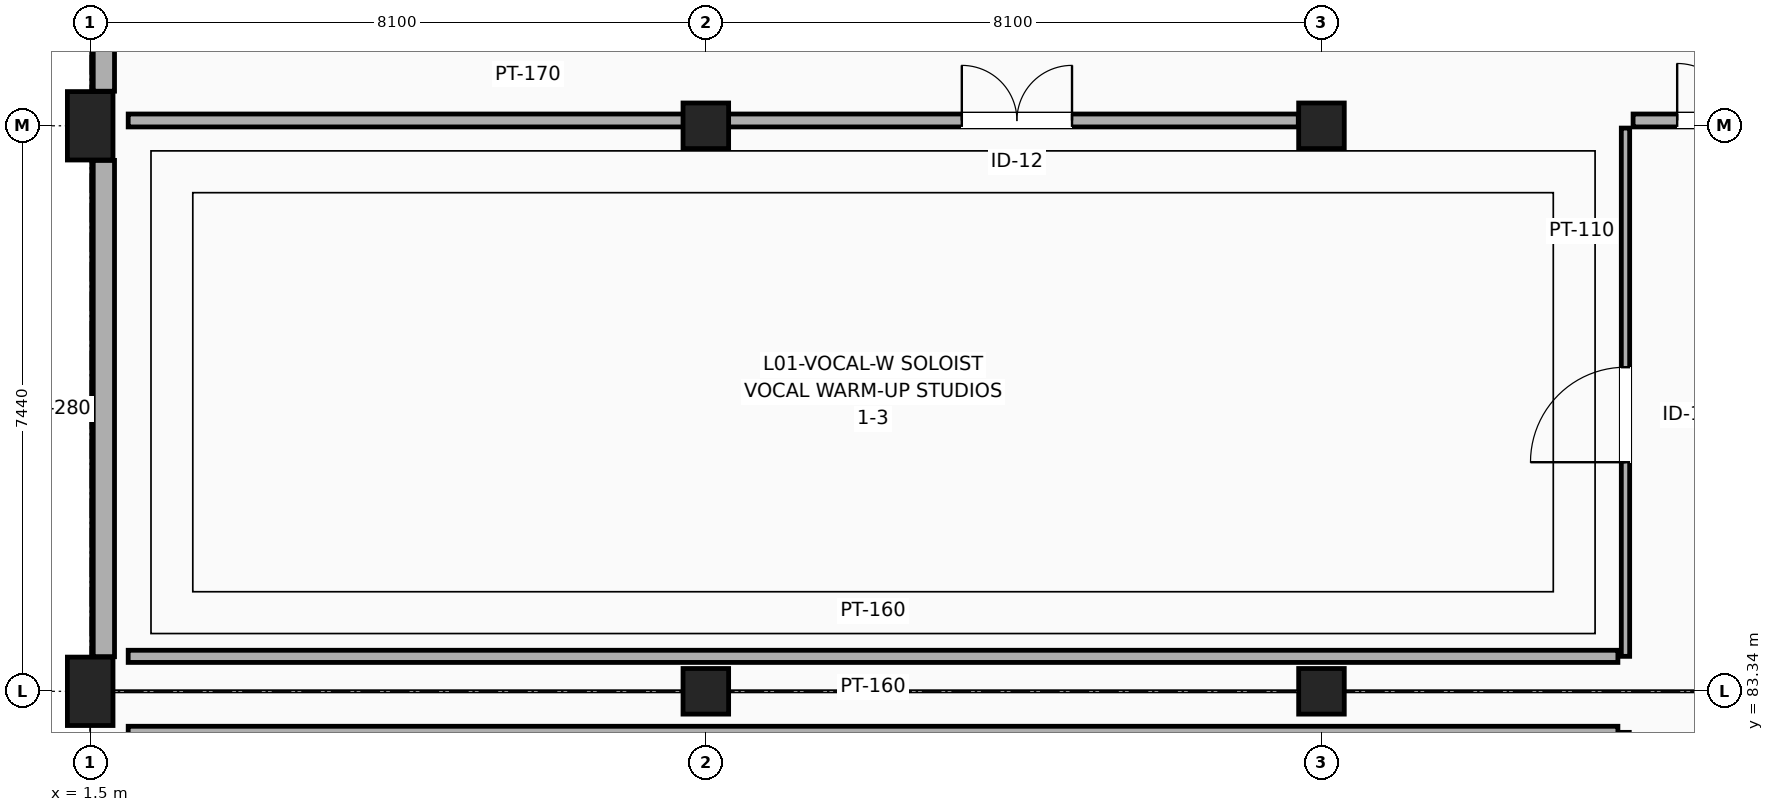
"""IFC4 building model, lengths in metres.
Left out: names, types, materials, properties, quantities, classifications, styles, units other than length and angle.
Written with IfcOpenShell. Run it as: python <this file> out.ifc"""

import sys

from ifc_helpers import new_model, si_unit, direction, frame, frame_2d, origin, origin_2d, place, context, subcontext, project, spatial, rectangle, extrude, element, fill, save


model = new_model("IFC4")
c1 = context("Model", 3, precision=1e-05, world=origin(), true_north=direction((0.0, 1.0)))
c2 = subcontext(c1, "Body", "Model", "MODEL_VIEW")
j1 = project(units=[si_unit("LENGTHUNIT", "METRE"), si_unit("PLANEANGLEUNIT", "RADIAN")], contexts=[c1])
p1 = place(None, origin())
s1 = spatial("IfcSite", under=j1, at=p1, CompositionType="ELEMENT")
p2 = place(p1, origin())
s2 = spatial("IfcBuilding", under=s1, at=p2, CompositionType="ELEMENT")
p3 = place(p2, frame((0.0, 0.0, 5.4)))
s3 = spatial("IfcBuildingStorey", under=s2, at=p3, CompositionType="ELEMENT", Elevation=5.4)
for number, where, z_axis, x_axis in (
    (1, (1.5, 83.34, 0.0), (0.0, 0.0, 1.0), (1.0, 0.0, 0.0)),
    (2, (1.5, 90.78, 0.0), (0.0, 0.0, 1.0), (1.0, 0.0, 0.0)),
):
    element("IfcColumn", number, at=place(p3, frame(where, z_axis=z_axis, x_axis=x_axis)), inside=s3, PredefinedType="COLUMN", context=c2, shape_type="SweptSolid", body=[
        extrude(rectangle(XDim=0.6, YDim=0.9, at=origin_2d()), origin(), (0.0, 0.0, 1.0), 4.8),
    ])
for number, where, z_axis, x_axis in (
    (3, (9.6, 83.34, 0.0), (0.0, 0.0, 1.0), (1.0, 0.0, 0.0)),
    (4, (9.6, 90.78, 0.0), (0.0, 0.0, 1.0), (1.0, 0.0, 0.0)),
    (5, (17.7, 83.34, 0.0), (0.0, 0.0, 1.0), (1.0, 0.0, 0.0)),
    (6, (17.7, 90.78, 0.0), (0.0, 0.0, 1.0), (1.0, 0.0, 0.0)),
):
    element("IfcColumn", number, at=place(p3, frame(where, z_axis=z_axis, x_axis=x_axis)), inside=s3, PredefinedType="COLUMN", context=c2, shape_type="SweptSolid", body=[
        extrude(rectangle(XDim=0.6, YDim=0.6, at=origin_2d()), origin(), (0.0, 0.0, 1.0), 4.8),
    ])
p4 = place(p3, frame((1.68, 83.795, 0.0), z_axis=(0.0, 0.0, 1.0), x_axis=(0.0, 1.0, 0.0)))
e7 = element("IfcWall", 7, at=p4, inside=s3, PredefinedType="SOLIDWALL", context=c2, shape_type="SweptSolid", body=[
    extrude(rectangle(XDim=6.53, YDim=0.28, at=frame_2d((3.265, 0.0))), origin(), (0.0, 0.0, 1.0), 4.187),
])
p5 = place(p3, frame((1.68, 91.235, 0.0), z_axis=(0.0, 0.0, 1.0), x_axis=(0.0, 1.0, 0.0)))
e8 = element("IfcWall", 8, at=p5, inside=s3, PredefinedType="SOLIDWALL", context=c2, shape_type="SweptSolid", body=[
    extrude(rectangle(XDim=6.53, YDim=0.28, at=frame_2d((3.265, 0.0))), origin(), (0.0, 0.0, 1.0), 4.187),
])
p6 = place(p3, frame((21.7, 71.4, 0.0), z_axis=(0.0, 0.0, 1.0), x_axis=(0.0, 1.0, 0.0)))
e9 = element("IfcWall", 9, at=p6, inside=s3, PredefinedType="PARTITIONING", context=c2, shape_type="SweptSolid", body=[
    extrude(rectangle(XDim=11.4, YDim=0.1, at=frame_2d((5.7, 0.0))), origin(), (0.0, 0.0, 1.0), 3.987),
])
p7 = place(p6, frame((7.453, 0.0, 0.0)))
e10 = element("IfcOpeningElement", 10, at=p7, cuts=e9, PredefinedType="OPENING", context=c2, shape_type="SweptSolid", body=[
    extrude(rectangle(XDim=1.6, YDim=2.3, at=frame_2d((0.8, 1.15))), frame((0.0, 0.06, 0.0), z_axis=(0.0, -1.0, 0.0), x_axis=(1.0, 0.0, 0.0)), (0.0, 0.0, 1.0), 0.12),
])
p8 = place(p3, frame((21.8, 90.85, 0.0), z_axis=(0.0, 0.0, 1.0), x_axis=(1.0, 0.0, 0.0)))
e11 = element("IfcWall", 11, at=p8, inside=s3, PredefinedType="PARTITIONING", context=c2, shape_type="SweptSolid", body=[
    extrude(rectangle(XDim=3.6, YDim=0.17, at=frame_2d((1.8, 0.0))), origin(), (0.0, 0.0, 1.0), 3.987),
])
p9 = place(p8, frame((0.58, 0.0, 0.0)))
e12 = element("IfcOpeningElement", 12, at=p9, cuts=e11, PredefinedType="OPENING", context=c2, shape_type="SweptSolid", body=[
    extrude(rectangle(XDim=1.5, YDim=2.2, at=frame_2d((0.75, 1.1))), frame((0.0, 0.095, 0.0), z_axis=(0.0, -1.0, 0.0), x_axis=(1.0, 0.0, 0.0)), (0.0, 0.0, 1.0), 0.19),
])
p10 = place(p3, frame((21.7, 83.8, 0.0), z_axis=(0.0, 0.0, 1.0), x_axis=(0.0, 1.0, 0.0)))
e13 = element("IfcWall", 13, at=p10, inside=s3, PredefinedType="PARTITIONING", context=c2, shape_type="SweptSolid", body=[
    extrude(rectangle(XDim=6.95, YDim=0.11, at=frame_2d((3.475, 0.0))), origin(), (0.0, 0.0, 1.0), 3.987),
])
p11 = place(p10, frame((2.554, 0.0, 0.0)))
e14 = element("IfcOpeningElement", 14, at=p11, cuts=e13, PredefinedType="OPENING", context=c2, shape_type="SweptSolid", body=[
    extrude(rectangle(XDim=1.25, YDim=2.15, at=frame_2d((0.625, 1.075))), frame((0.0, 0.065, 0.0), z_axis=(0.0, -1.0, 0.0), x_axis=(1.0, 0.0, 0.0)), (0.0, 0.0, 1.0), 0.13),
])
p12 = place(p3, frame((2.0, 90.85, 0.0), z_axis=(0.0, 0.0, 1.0), x_axis=(1.0, 0.0, 0.0)))
e15 = element("IfcWall", 15, at=p12, inside=s3, PredefinedType="PARTITIONING", context=c2, shape_type="SweptSolid", body=[
    extrude(rectangle(XDim=15.395, YDim=0.17, at=frame_2d((7.698, 0.0))), origin(), (0.0, 0.0, 1.0), 3.687),
])
p13 = place(p12, frame((10.968, 0.0, 0.0)))
e16 = element("IfcOpeningElement", 16, at=p13, cuts=e15, PredefinedType="OPENING", context=c2, shape_type="SweptSolid", body=[
    extrude(rectangle(XDim=1.45, YDim=2.3, at=frame_2d((0.725, 1.15))), frame((0.0, 0.095, 0.0), z_axis=(0.0, -1.0, 0.0), x_axis=(1.0, 0.0, 0.0)), (0.0, 0.0, 1.0), 0.19),
])
p14 = place(p3, frame((2.0, 82.8, 0.0), z_axis=(0.0, 0.0, 1.0), x_axis=(1.0, 0.0, 0.0)))
e17 = element("IfcWall", 17, at=p14, inside=s3, PredefinedType="PARTITIONING", context=c2, shape_type="SweptSolid", body=[
    extrude(rectangle(XDim=19.6, YDim=0.16, at=frame_2d((9.8, 0.0))), origin(), (0.0, 0.0, 1.0), 3.887),
])
p15 = place(p3, frame((2.0, 83.8, 0.0), z_axis=(0.0, 0.0, 1.0), x_axis=(1.0, 0.0, 0.0)))
e18 = element("IfcWall", 18, at=p15, inside=s3, PredefinedType="PARTITIONING", context=c2, shape_type="SweptSolid", body=[
    extrude(rectangle(XDim=19.6, YDim=0.16, at=frame_2d((9.8, 0.0))), origin(), (0.0, 0.0, 1.0), 3.837),
])
p16 = place(p9, origin())
e19 = element("IfcDoor", 19, at=p16, inside=s3, OperationType="DOUBLE_DOOR_SINGLE_SWING", PredefinedType="DOOR", context=c2, shape_type="SweptSolid", body=[
    extrude(rectangle(XDim=1.5, YDim=2.2, at=frame_2d((0.75, 1.1))), frame((0.0, 0.025, 0.0), z_axis=(0.0, -1.0, 0.0), x_axis=(1.0, 0.0, 0.0)), (0.0, 0.0, 1.0), 0.05),
])
fill(e12, e19)
p17 = place(p11, origin())
e20 = element("IfcDoor", 20, at=p17, inside=s3, OperationType="SINGLE_SWING_LEFT", PredefinedType="DOOR", context=c2, shape_type="SweptSolid", body=[
    extrude(rectangle(XDim=1.25, YDim=2.15, at=frame_2d((0.625, 1.075))), frame((0.0, 0.025, 0.0), z_axis=(0.0, -1.0, 0.0), x_axis=(1.0, 0.0, 0.0)), (0.0, 0.0, 1.0), 0.05),
])
fill(e14, e20)
p18 = place(p13, origin())
e21 = element("IfcDoor", 21, at=p18, inside=s3, OperationType="DOUBLE_DOOR_SINGLE_SWING", PredefinedType="DOOR", context=c2, shape_type="SweptSolid", body=[
    extrude(rectangle(XDim=1.45, YDim=2.3, at=frame_2d((0.725, 1.15))), frame((0.0, 0.025, 0.0), z_axis=(0.0, -1.0, 0.0), x_axis=(1.0, 0.0, 0.0)), (0.0, 0.0, 1.0), 0.05),
])
fill(e16, e21)
save(model, sys.argv[1])
